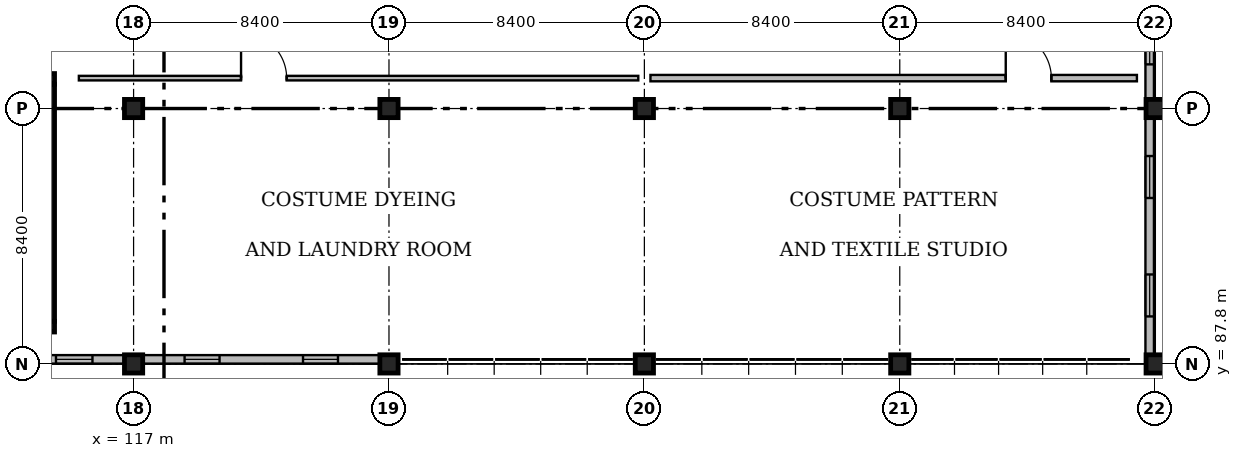
"""IFC4 building model, lengths in metres.
Left out: names, types, materials, properties, quantities, classifications, styles, units other than length and angle.
Written with IfcOpenShell. Run it as: python <this file> out.ifc"""

import sys

from ifc_helpers import new_model, si_unit, direction, frame, frame_2d, origin, origin_2d, place, context, subcontext, project, spatial, rectangle, extrude, element, fill, save


model = new_model("IFC4")
c1 = context("Model", 3, precision=1e-05, world=origin(), true_north=direction((0.0, 1.0)))
c2 = subcontext(c1, "Body", "Model", "MODEL_VIEW")
j1 = project(units=[si_unit("LENGTHUNIT", "METRE"), si_unit("PLANEANGLEUNIT", "RADIAN")], contexts=[c1])
p1 = place(None, origin())
s1 = spatial("IfcSite", under=j1, at=p1, CompositionType="ELEMENT")
p2 = place(p1, origin())
s2 = spatial("IfcBuilding", under=s1, at=p2, CompositionType="ELEMENT")
p3 = place(p2, frame((0.0, 0.0, 9.0)))
s3 = spatial("IfcBuildingStorey", under=s2, at=p3, CompositionType="ELEMENT", Elevation=9.0)
for number, where, z_axis, x_axis in (
    (1, (117.0, 87.8, 0.0), (0.0, 0.0, 1.0), (1.0, 0.0, 0.0)),
    (2, (117.0, 96.2, 0.0), (0.0, 0.0, 1.0), (1.0, 0.0, 0.0)),
    (3, (125.4, 87.8, 0.0), (0.0, 0.0, 1.0), (1.0, 0.0, 0.0)),
    (4, (125.4, 96.2, 0.0), (0.0, 0.0, 1.0), (1.0, 0.0, 0.0)),
    (5, (133.8, 87.8, 0.0), (0.0, 0.0, 1.0), (1.0, 0.0, 0.0)),
    (6, (133.8, 96.2, 0.0), (0.0, 0.0, 1.0), (1.0, 0.0, 0.0)),
    (7, (142.2, 87.8, 0.0), (0.0, 0.0, 1.0), (1.0, 0.0, 0.0)),
    (8, (142.2, 96.2, 0.0), (0.0, 0.0, 1.0), (1.0, 0.0, 0.0)),
    (9, (150.6, 87.8, 0.0), (0.0, 0.0, 1.0), (1.0, 0.0, 0.0)),
    (10, (150.6, 96.2, 0.0), (0.0, 0.0, 1.0), (1.0, 0.0, 0.0)),
):
    element("IfcColumn", number, at=place(p3, frame(where, z_axis=z_axis, x_axis=x_axis)), inside=s3, PredefinedType="COLUMN", context=c2, shape_type="SweptSolid", body=[
        extrude(rectangle(XDim=0.6, YDim=0.6, at=origin_2d()), origin(), (0.0, 0.0, 1.0), 4.2),
    ])
p4 = place(p3, frame((114.4, 89.025, 0.0), z_axis=(0.0, 0.0, 1.0), x_axis=(-1.0, 0.0, 0.0)))
e11 = element("IfcWall", 11, at=p4, inside=s3, PredefinedType="SOLIDWALL", context=c2, shape_type="SweptSolid", body=[
    extrude(rectangle(XDim=4.15, YDim=0.35, at=frame_2d((2.075, 0.0))), origin(), (0.0, 0.0, 1.0), 4.2),
])
p5 = place(p3, frame((110.25, 97.175, 0.0), z_axis=(0.0, 0.0, 1.0), x_axis=(1.0, 0.0, 0.0)))
e12 = element("IfcWall", 12, at=p5, inside=s3, PredefinedType="SOLIDWALL", context=c2, shape_type="SweptSolid", body=[
    extrude(rectangle(XDim=4.15, YDim=0.35, at=frame_2d((2.075, 0.0))), origin(), (0.0, 0.0, 1.0), 4.2),
])
p6 = place(p5, frame((1.525, 0.0, 0.0)))
e13 = element("IfcOpeningElement", 13, at=p6, cuts=e12, PredefinedType="OPENING", context=c2, shape_type="SweptSolid", body=[
    extrude(rectangle(XDim=1.1, YDim=2.15, at=frame_2d((0.55, 1.075))), frame((0.0, 0.195, 0.0), z_axis=(0.0, -1.0, 0.0), x_axis=(1.0, 0.0, 0.0)), (0.0, 0.0, 1.0), 0.39),
])
p7 = place(p3, frame((114.225, 97.0, 0.0), z_axis=(0.0, 0.0, 1.0), x_axis=(0.0, -1.0, 0.0)))
e14 = element("IfcWall", 14, at=p7, inside=s3, PredefinedType="SOLIDWALL", context=c2, shape_type="SweptSolid", body=[
    extrude(rectangle(XDim=7.8, YDim=0.35, at=frame_2d((3.9, 0.0))), origin(), (0.0, 0.0, 1.0), 4.2),
])
p8 = place(p3, frame((110.105, 87.95, 0.0), z_axis=(0.0, 0.0, 1.0), x_axis=(1.0, 0.0, 0.0)))
e15 = element("IfcWall", 15, at=p8, inside=s3, PredefinedType="SOLIDWALL", context=c2, shape_type="SweptSolid", body=[
    extrude(rectangle(XDim=6.59, YDim=0.28, at=frame_2d((3.295, 0.0))), origin(), (0.0, 0.0, 1.0), 3.263),
])
p9 = place(p8, frame((1.048, 0.0, 0.95)))
e16 = element("IfcOpeningElement", 16, at=p9, cuts=e15, PredefinedType="OPENING", context=c2, shape_type="SweptSolid", body=[
    extrude(rectangle(XDim=1.2, YDim=1.9, at=frame_2d((0.6, 0.95))), frame((0.0, 0.16, 0.0), z_axis=(0.0, -1.0, 0.0), x_axis=(1.0, 0.0, 0.0)), (0.0, 0.0, 1.0), 0.32),
])
p10 = place(p8, frame((4.343, 0.0, 0.95)))
e17 = element("IfcOpeningElement", 17, at=p10, cuts=e15, PredefinedType="OPENING", context=c2, shape_type="SweptSolid", body=[
    extrude(rectangle(XDim=1.2, YDim=1.9, at=frame_2d((0.6, 0.95))), frame((0.0, 0.16, 0.0), z_axis=(0.0, -1.0, 0.0), x_axis=(1.0, 0.0, 0.0)), (0.0, 0.0, 1.0), 0.32),
])
p11 = place(p3, frame((117.305, 87.95, 0.0), z_axis=(0.0, 0.0, 1.0), x_axis=(1.0, 0.0, 0.0)))
e18 = element("IfcWall", 18, at=p11, inside=s3, PredefinedType="SOLIDWALL", context=c2, shape_type="SweptSolid", body=[
    extrude(rectangle(XDim=7.79, YDim=0.28, at=frame_2d((3.895, 0.0))), origin(), (0.0, 0.0, 1.0), 3.263),
])
p12 = place(p11, frame((1.373, 0.0, 0.95)))
e19 = element("IfcOpeningElement", 19, at=p12, cuts=e18, PredefinedType="OPENING", context=c2, shape_type="SweptSolid", body=[
    extrude(rectangle(XDim=1.15, YDim=1.95, at=frame_2d((0.575, 0.975))), frame((0.0, 0.16, 0.0), z_axis=(0.0, -1.0, 0.0), x_axis=(1.0, 0.0, 0.0)), (0.0, 0.0, 1.0), 0.32),
])
p13 = place(p11, frame((5.268, 0.0, 0.95)))
e20 = element("IfcOpeningElement", 20, at=p13, cuts=e18, PredefinedType="OPENING", context=c2, shape_type="SweptSolid", body=[
    extrude(rectangle(XDim=1.15, YDim=1.95, at=frame_2d((0.575, 0.975))), frame((0.0, 0.16, 0.0), z_axis=(0.0, -1.0, 0.0), x_axis=(1.0, 0.0, 0.0)), (0.0, 0.0, 1.0), 0.32),
])
p14 = place(p3, frame((150.42, 88.105, 0.0), z_axis=(0.0, 0.0, 1.0), x_axis=(0.0, 1.0, 0.0)))
e21 = element("IfcWall", 21, at=p14, inside=s3, PredefinedType="SOLIDWALL", context=c2, shape_type="SweptSolid", body=[
    extrude(rectangle(XDim=7.79, YDim=0.28, at=frame_2d((3.895, 0.0))), origin(), (0.0, 0.0, 1.0), 3.673),
])
p15 = place(p14, frame((1.258, 0.0, 0.95)))
e22 = element("IfcOpeningElement", 22, at=p15, cuts=e21, PredefinedType="OPENING", context=c2, shape_type="SweptSolid", body=[
    extrude(rectangle(XDim=1.38, YDim=1.95, at=frame_2d((0.69, 0.975))), frame((0.0, 0.16, 0.0), z_axis=(0.0, -1.0, 0.0), x_axis=(1.0, 0.0, 0.0)), (0.0, 0.0, 1.0), 0.32),
])
p16 = place(p14, frame((5.153, 0.0, 0.95)))
e23 = element("IfcOpeningElement", 23, at=p16, cuts=e21, PredefinedType="OPENING", context=c2, shape_type="SweptSolid", body=[
    extrude(rectangle(XDim=1.38, YDim=1.95, at=frame_2d((0.69, 0.975))), frame((0.0, 0.16, 0.0), z_axis=(0.0, -1.0, 0.0), x_axis=(1.0, 0.0, 0.0)), (0.0, 0.0, 1.0), 0.32),
])
p17 = place(p3, frame((150.42, 96.505, 0.0), z_axis=(0.0, 0.0, 1.0), x_axis=(0.0, 1.0, 0.0)))
e24 = element("IfcWall", 24, at=p17, inside=s3, PredefinedType="SOLIDWALL", context=c2, shape_type="SweptSolid", body=[
    extrude(rectangle(XDim=7.19, YDim=0.28, at=frame_2d((3.595, 0.0))), origin(), (0.0, 0.0, 1.0), 3.673),
])
p18 = place(p17, frame((1.147, 0.0, 0.95)))
e25 = element("IfcOpeningElement", 25, at=p18, cuts=e24, PredefinedType="OPENING", context=c2, shape_type="SweptSolid", body=[
    extrude(rectangle(XDim=1.3, YDim=1.65, at=frame_2d((0.65, 0.825))), frame((0.0, 0.16, 0.0), z_axis=(0.0, -1.0, 0.0), x_axis=(1.0, 0.0, 0.0)), (0.0, 0.0, 1.0), 0.32),
])
p19 = place(p17, frame((4.742, 0.0, 0.95)))
e26 = element("IfcOpeningElement", 26, at=p19, cuts=e24, PredefinedType="OPENING", context=c2, shape_type="SweptSolid", body=[
    extrude(rectangle(XDim=1.3, YDim=1.65, at=frame_2d((0.65, 0.825))), frame((0.0, 0.16, 0.0), z_axis=(0.0, -1.0, 0.0), x_axis=(1.0, 0.0, 0.0)), (0.0, 0.0, 1.0), 0.32),
])
p20 = place(p3, frame((115.2, 97.2, 0.0), z_axis=(0.0, 0.0, 1.0), x_axis=(1.0, 0.0, 0.0)))
e27 = element("IfcWall", 27, at=p20, inside=s3, PredefinedType="PARTITIONING", context=c2, shape_type="SweptSolid", body=[
    extrude(rectangle(XDim=18.4, YDim=0.15, at=frame_2d((9.2, 0.0))), origin(), (0.0, 0.0, 1.0), 3.93),
])
p21 = place(p20, frame((5.335, 0.0, 0.0)))
e28 = element("IfcOpeningElement", 28, at=p21, cuts=e27, PredefinedType="OPENING", context=c2, shape_type="SweptSolid", body=[
    extrude(rectangle(XDim=1.5, YDim=2.25, at=frame_2d((0.75, 1.125))), frame((0.0, 0.095, 0.0), z_axis=(0.0, -1.0, 0.0), x_axis=(1.0, 0.0, 0.0)), (0.0, 0.0, 1.0), 0.19),
])
p22 = place(p3, frame((134.0, 97.2, 0.0), z_axis=(0.0, 0.0, 1.0), x_axis=(1.0, 0.0, 0.0)))
e29 = element("IfcWall", 29, at=p22, inside=s3, PredefinedType="PARTITIONING", context=c2, shape_type="SweptSolid", body=[
    extrude(rectangle(XDim=16.0, YDim=0.21, at=frame_2d((8.0, 0.0))), origin(), (0.0, 0.0, 1.0), 3.93),
])
p23 = place(p22, frame((11.686, 0.0, 0.0)))
e30 = element("IfcOpeningElement", 30, at=p23, cuts=e29, PredefinedType="OPENING", context=c2, shape_type="SweptSolid", body=[
    extrude(rectangle(XDim=1.5, YDim=2.25, at=frame_2d((0.75, 1.125))), frame((0.0, 0.125, 0.0), z_axis=(0.0, -1.0, 0.0), x_axis=(1.0, 0.0, 0.0)), (0.0, 0.0, 1.0), 0.25),
])
p24 = place(p10, origin())
e31 = element("IfcWindow", 31, at=p24, inside=s3, PartitioningType="SINGLE_PANEL", PredefinedType="WINDOW", context=c2, shape_type="SweptSolid", body=[
    extrude(rectangle(XDim=1.2, YDim=1.9, at=frame_2d((0.6, 0.95))), frame((0.0, 0.03, 0.0), z_axis=(0.0, -1.0, 0.0), x_axis=(1.0, 0.0, 0.0)), (0.0, 0.0, 1.0), 0.06),
])
fill(e17, e31)
p25 = place(p12, origin())
e32 = element("IfcWindow", 32, at=p25, inside=s3, PartitioningType="SINGLE_PANEL", PredefinedType="WINDOW", context=c2, shape_type="SweptSolid", body=[
    extrude(rectangle(XDim=1.15, YDim=1.95, at=frame_2d((0.575, 0.975))), frame((0.0, 0.03, 0.0), z_axis=(0.0, -1.0, 0.0), x_axis=(1.0, 0.0, 0.0)), (0.0, 0.0, 1.0), 0.06),
])
fill(e19, e32)
p26 = place(p13, origin())
e33 = element("IfcWindow", 33, at=p26, inside=s3, PartitioningType="SINGLE_PANEL", PredefinedType="WINDOW", context=c2, shape_type="SweptSolid", body=[
    extrude(rectangle(XDim=1.15, YDim=1.95, at=frame_2d((0.575, 0.975))), frame((0.0, 0.03, 0.0), z_axis=(0.0, -1.0, 0.0), x_axis=(1.0, 0.0, 0.0)), (0.0, 0.0, 1.0), 0.06),
])
fill(e20, e33)
p27 = place(p15, origin())
e34 = element("IfcWindow", 34, at=p27, inside=s3, PartitioningType="SINGLE_PANEL", PredefinedType="WINDOW", context=c2, shape_type="SweptSolid", body=[
    extrude(rectangle(XDim=1.38, YDim=1.95, at=frame_2d((0.69, 0.975))), frame((0.0, 0.03, 0.0), z_axis=(0.0, -1.0, 0.0), x_axis=(1.0, 0.0, 0.0)), (0.0, 0.0, 1.0), 0.06),
])
fill(e22, e34)
p28 = place(p16, origin())
e35 = element("IfcWindow", 35, at=p28, inside=s3, PartitioningType="SINGLE_PANEL", PredefinedType="WINDOW", context=c2, shape_type="SweptSolid", body=[
    extrude(rectangle(XDim=1.38, YDim=1.95, at=frame_2d((0.69, 0.975))), frame((0.0, 0.03, 0.0), z_axis=(0.0, -1.0, 0.0), x_axis=(1.0, 0.0, 0.0)), (0.0, 0.0, 1.0), 0.06),
])
fill(e23, e35)
p29 = place(p18, origin())
e36 = element("IfcWindow", 36, at=p29, inside=s3, PartitioningType="SINGLE_PANEL", PredefinedType="WINDOW", context=c2, shape_type="SweptSolid", body=[
    extrude(rectangle(XDim=1.3, YDim=1.65, at=frame_2d((0.65, 0.825))), frame((0.0, 0.03, 0.0), z_axis=(0.0, -1.0, 0.0), x_axis=(1.0, 0.0, 0.0)), (0.0, 0.0, 1.0), 0.06),
])
fill(e25, e36)
p30 = place(p21, origin())
e37 = element("IfcDoor", 37, at=p30, inside=s3, OperationType="DOUBLE_DOOR_SINGLE_SWING", PredefinedType="DOOR", context=c2, shape_type="SweptSolid", body=[
    extrude(rectangle(XDim=1.5, YDim=2.25, at=frame_2d((0.75, 1.125))), frame((0.0, 0.025, 0.0), z_axis=(0.0, -1.0, 0.0), x_axis=(1.0, 0.0, 0.0)), (0.0, 0.0, 1.0), 0.05),
])
fill(e28, e37)
p31 = place(p23, origin())
e38 = element("IfcDoor", 38, at=p31, inside=s3, OperationType="DOUBLE_DOOR_SINGLE_SWING", PredefinedType="DOOR", context=c2, shape_type="SweptSolid", body=[
    extrude(rectangle(XDim=1.5, YDim=2.25, at=frame_2d((0.75, 1.125))), frame((0.0, 0.025, 0.0), z_axis=(0.0, -1.0, 0.0), x_axis=(1.0, 0.0, 0.0)), (0.0, 0.0, 1.0), 0.05),
])
fill(e30, e38)
save(model, sys.argv[1])
